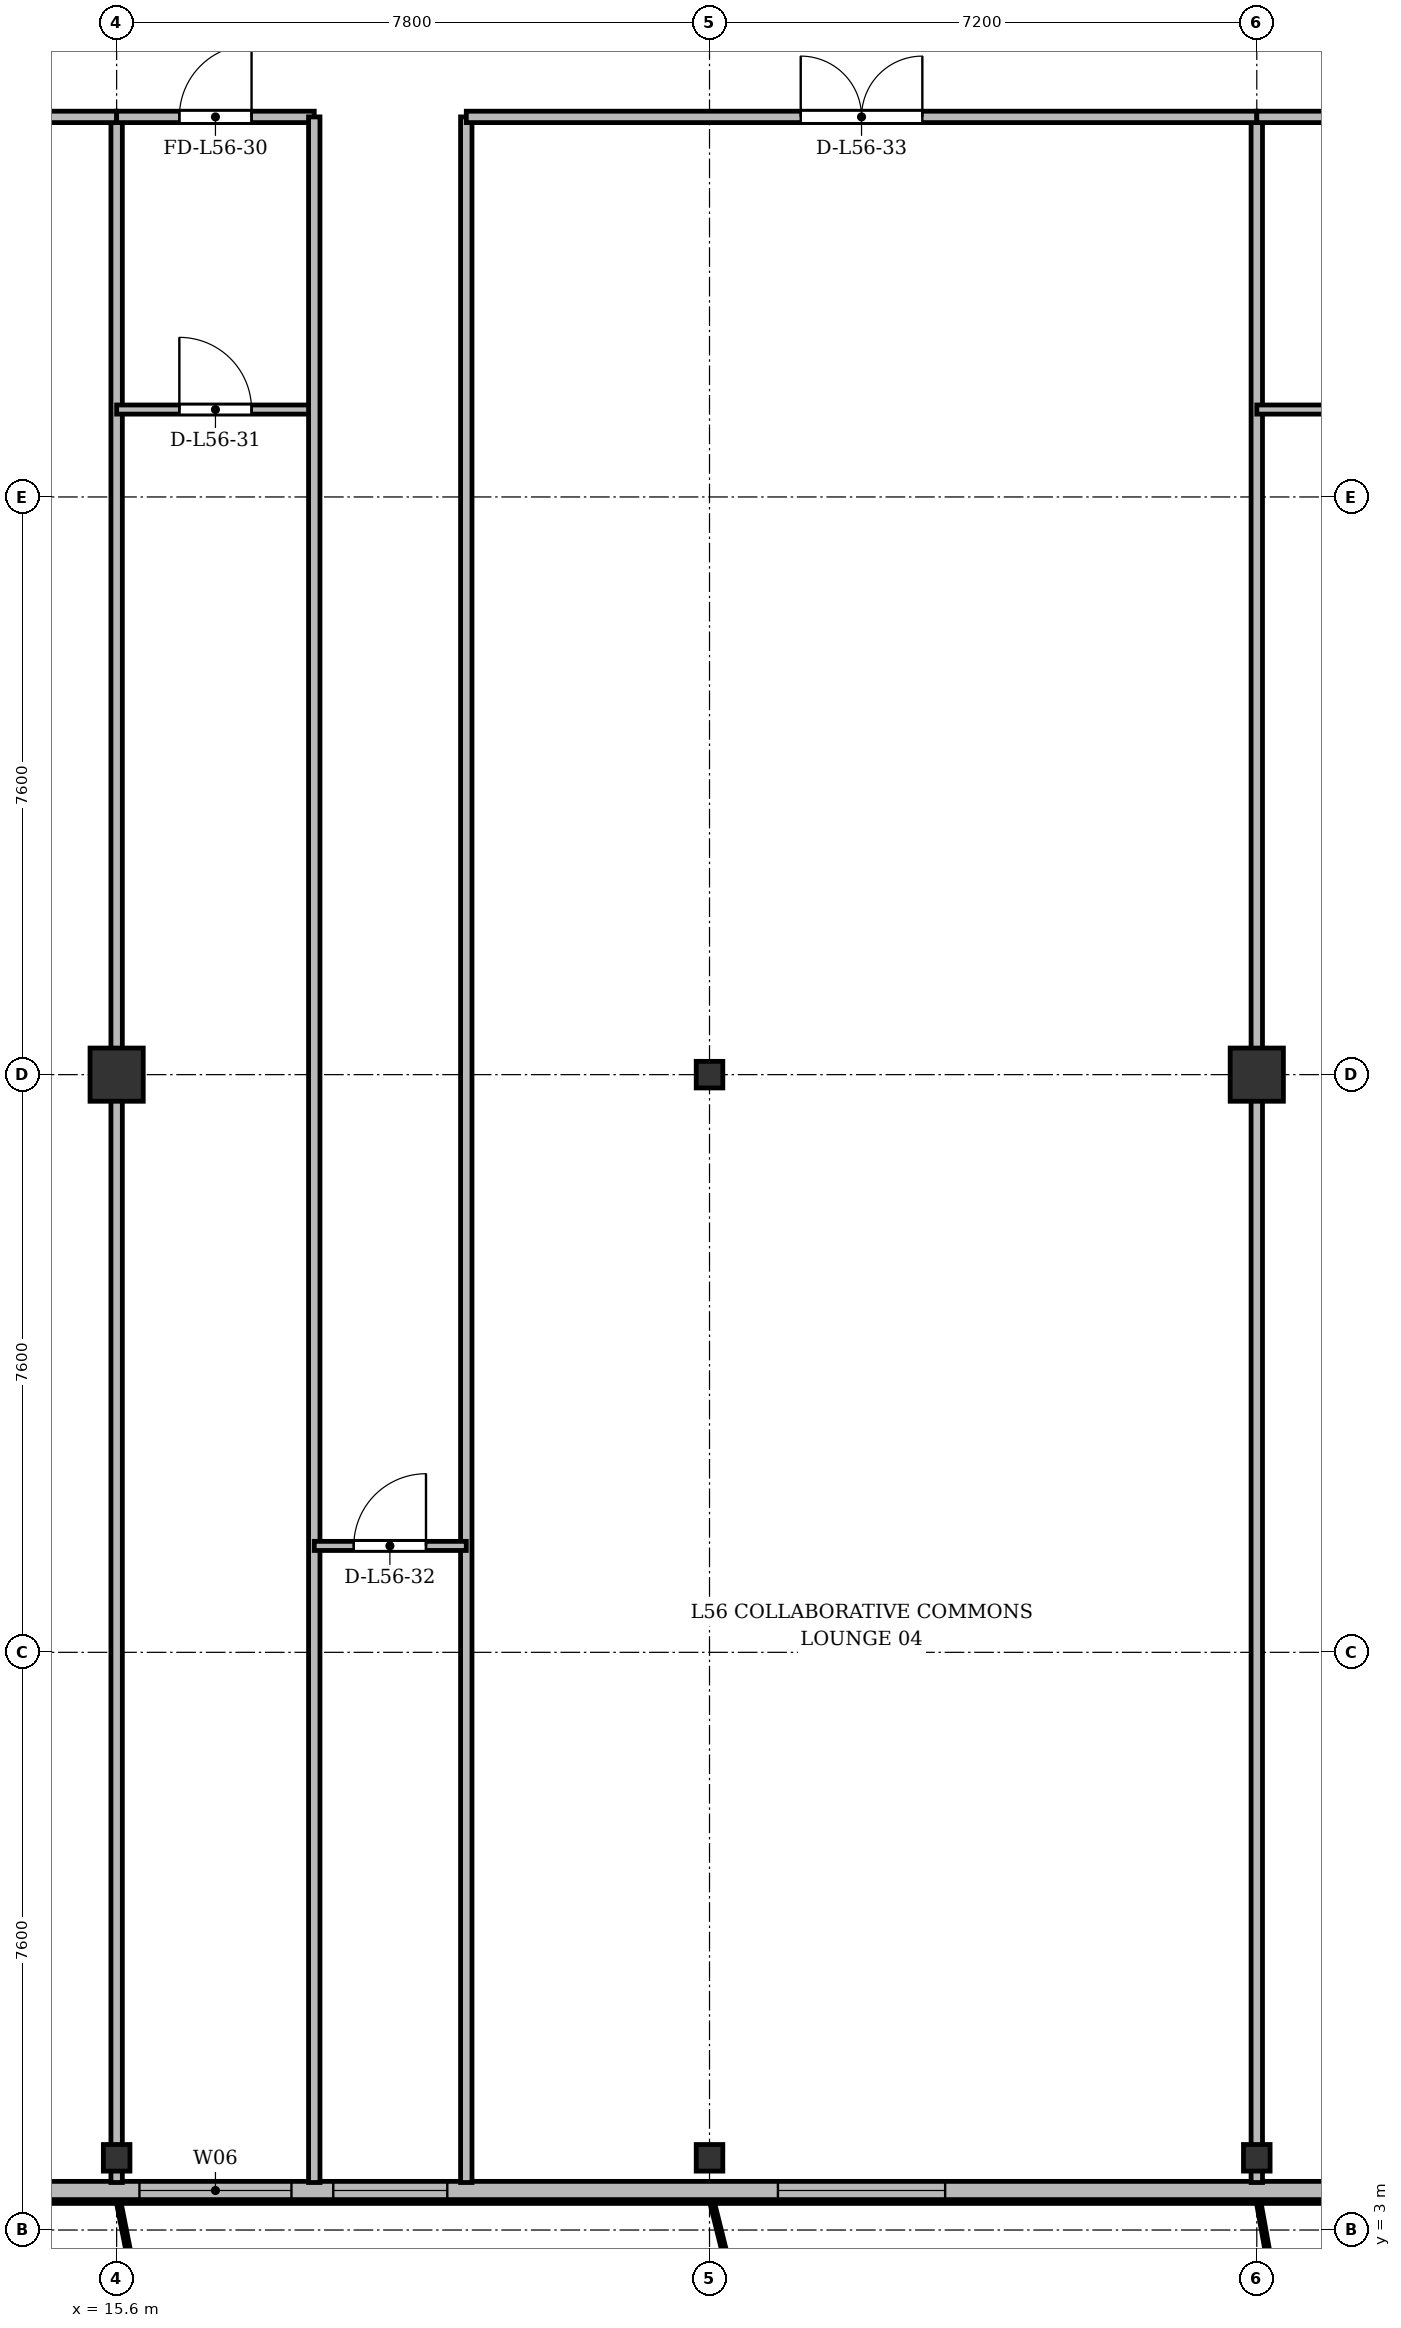
"""IFC4 building model, lengths in metres.
Left out: names, types, materials, properties, quantities, classifications, styles, units other than length and angle.
Written with IfcOpenShell. Run it as: python <this file> out.ifc"""

import sys

from ifc_helpers import new_model, si_unit, direction, frame, frame_2d, origin, origin_2d, place, context, subcontext, project, spatial, rectangle, i_section, extrude, source, transform, mapped, element, fill, save


model = new_model("IFC4")
c1 = context("Model", 3, precision=1e-05, world=origin(), true_north=direction((0.0, 1.0)))
c2 = subcontext(c1, "Body", "Model", "MODEL_VIEW")
j1 = project(units=[si_unit("LENGTHUNIT", "METRE"), si_unit("PLANEANGLEUNIT", "RADIAN")], contexts=[c1])
p1 = place(None, origin())
s1 = spatial("IfcSite", under=j1, at=p1, CompositionType="ELEMENT")
p2 = place(p1, origin())
s2 = spatial("IfcBuilding", under=s1, at=p2, CompositionType="ELEMENT")
p3 = place(p2, frame((0.0, 0.0, 215.7)))
s3 = spatial("IfcBuildingStorey", under=s2, at=p3, CompositionType="ELEMENT", Elevation=215.7)
m1 = source(origin(), c2, "Body", "SweptSolid", [
    extrude(i_section(OverallWidth=0.35, OverallDepth=0.35, WebThickness=0.018, FlangeThickness=0.028, at=origin_2d()), origin(), (0.0, 0.0, 1.0), 3.6),
])
p4 = place(p3, frame((15.6, 3.95, 0.0), z_axis=(0.0, 0.0, 1.0), x_axis=(1.0, 0.0, 0.0)))
e1 = element("IfcColumn", 1, at=p4, inside=s3, PredefinedType="COLUMN", context=c2, shape_type="MappedRepresentation", body=[
    mapped(m1, transform((0.0, 0.0, 0.0), x_axis=(1.0, 0.0, 0.0), y_axis=(0.0, 1.0, 0.0), z_axis=(0.0, 0.0, 1.0), scale=1.0)),
])
m2 = source(origin(), c2, "Body", "SweptSolid", [
    extrude(rectangle(XDim=0.7, YDim=0.7, at=origin_2d()), origin(), (0.0, 0.0, 1.0), 3.6),
])
p5 = place(p3, frame((15.6, 18.2, 0.0), z_axis=(0.0, 0.0, 1.0), x_axis=(1.0, 0.0, 0.0)))
e2 = element("IfcColumn", 2, at=p5, inside=s3, PredefinedType="COLUMN", context=c2, shape_type="MappedRepresentation", body=[
    mapped(m2, transform((0.0, 0.0, 0.0), x_axis=(1.0, 0.0, 0.0), y_axis=(0.0, 1.0, 0.0), z_axis=(0.0, 0.0, 1.0), scale=1.0)),
])
for number, where, z_axis, x_axis in (
    (3, (23.4, 3.95, 0.0), (0.0, 0.0, 1.0), (1.0, 0.0, 0.0)),
    (4, (23.4, 18.2, 0.0), (0.0, 0.0, 1.0), (1.0, 0.0, 0.0)),
    (5, (30.6, 3.95, 0.0), (0.0, 0.0, 1.0), (1.0, 0.0, 0.0)),
):
    element("IfcColumn", number, at=place(p3, frame(where, z_axis=z_axis, x_axis=x_axis)), inside=s3, PredefinedType="COLUMN", context=c2, shape_type="MappedRepresentation", body=[
        mapped(m1, transform((0.0, 0.0, 0.0), x_axis=(1.0, 0.0, 0.0), y_axis=(0.0, 1.0, 0.0), z_axis=(0.0, 0.0, 1.0), scale=1.0)),
    ])
p6 = place(p3, frame((30.6, 18.2, 0.0), z_axis=(0.0, 0.0, 1.0), x_axis=(1.0, 0.0, 0.0)))
e6 = element("IfcColumn", 6, at=p6, inside=s3, PredefinedType="COLUMN", context=c2, shape_type="MappedRepresentation", body=[
    mapped(m2, transform((0.0, 0.0, 0.0), x_axis=(1.0, 0.0, 0.0), y_axis=(0.0, 1.0, 0.0), z_axis=(0.0, 0.0, 1.0), scale=1.0)),
])
p7 = place(p3, frame((63.4, 3.52, 0.0), z_axis=(0.0, 0.0, 1.0), x_axis=(-1.0, 0.0, 0.0)))
e7 = element("IfcWall", 7, at=p7, inside=s3, PredefinedType="SOLIDWALL", context=c2, shape_type="SweptSolid", body=[
    extrude(rectangle(XDim=52.4, YDim=0.24, at=frame_2d((26.2, 0.0))), origin(), (0.0, 0.0, 1.0), 3.36),
])
p8 = place(p7, frame((1.245, 0.0, 0.9)))
e8 = element("IfcOpeningElement", 8, at=p8, cuts=e7, PredefinedType="OPENING", context=c2, shape_type="SweptSolid", body=[
    extrude(rectangle(XDim=2.2, YDim=1.8, at=frame_2d((1.1, 0.9))), frame((0.0, 0.13, 0.0), z_axis=(0.0, -1.0, 0.0), x_axis=(1.0, 0.0, 0.0)), (0.0, 0.0, 1.0), 0.26),
])
p9 = place(p7, frame((5.15, 0.0, 0.9)))
e9 = element("IfcOpeningElement", 9, at=p9, cuts=e7, PredefinedType="OPENING", context=c2, shape_type="SweptSolid", body=[
    extrude(rectangle(XDim=1.5, YDim=1.75, at=frame_2d((0.75, 0.875))), frame((0.0, 0.13, 0.0), z_axis=(0.0, -1.0, 0.0), x_axis=(1.0, 0.0, 0.0)), (0.0, 0.0, 1.0), 0.26),
])
p10 = place(p7, frame((7.45, 0.0, 0.9)))
e10 = element("IfcOpeningElement", 10, at=p10, cuts=e7, PredefinedType="OPENING", context=c2, shape_type="SweptSolid", body=[
    extrude(rectangle(XDim=1.5, YDim=1.75, at=frame_2d((0.75, 0.875))), frame((0.0, 0.13, 0.0), z_axis=(0.0, -1.0, 0.0), x_axis=(1.0, 0.0, 0.0)), (0.0, 0.0, 1.0), 0.26),
])
p11 = place(p7, frame((13.575, 0.0, 0.9)))
e11 = element("IfcOpeningElement", 11, at=p11, cuts=e7, PredefinedType="OPENING", context=c2, shape_type="SweptSolid", body=[
    extrude(rectangle(XDim=1.65, YDim=1.85, at=frame_2d((0.825, 0.925))), frame((0.0, 0.13, 0.0), z_axis=(0.0, -1.0, 0.0), x_axis=(1.0, 0.0, 0.0)), (0.0, 0.0, 1.0), 0.26),
])
p12 = place(p7, frame((25.3, 0.0, 0.9)))
e12 = element("IfcOpeningElement", 12, at=p12, cuts=e7, PredefinedType="OPENING", context=c2, shape_type="SweptSolid", body=[
    extrude(rectangle(XDim=1.8, YDim=1.8, at=frame_2d((0.9, 0.9))), frame((0.0, 0.13, 0.0), z_axis=(0.0, -1.0, 0.0), x_axis=(1.0, 0.0, 0.0)), (0.0, 0.0, 1.0), 0.26),
])
p13 = place(p7, frame((36.9, 0.0, 0.9)))
e13 = element("IfcOpeningElement", 13, at=p13, cuts=e7, PredefinedType="OPENING", context=c2, shape_type="SweptSolid", body=[
    extrude(rectangle(XDim=2.2, YDim=1.8, at=frame_2d((1.1, 0.9))), frame((0.0, 0.13, 0.0), z_axis=(0.0, -1.0, 0.0), x_axis=(1.0, 0.0, 0.0)), (0.0, 0.0, 1.0), 0.26),
])
p14 = place(p7, frame((43.45, 0.0, 0.9)))
e14 = element("IfcOpeningElement", 14, at=p14, cuts=e7, PredefinedType="OPENING", context=c2, shape_type="SweptSolid", body=[
    extrude(rectangle(XDim=1.5, YDim=1.75, at=frame_2d((0.75, 0.875))), frame((0.0, 0.13, 0.0), z_axis=(0.0, -1.0, 0.0), x_axis=(1.0, 0.0, 0.0)), (0.0, 0.0, 1.0), 0.26),
])
p15 = place(p7, frame((45.5, 0.0, 0.9)))
e15 = element("IfcOpeningElement", 15, at=p15, cuts=e7, PredefinedType="OPENING", context=c2, shape_type="SweptSolid", body=[
    extrude(rectangle(XDim=2.0, YDim=1.95, at=frame_2d((1.0, 0.975))), frame((0.0, 0.13, 0.0), z_axis=(0.0, -1.0, 0.0), x_axis=(1.0, 0.0, 0.0)), (0.0, 0.0, 1.0), 0.26),
])
p16 = place(p7, frame((49.23, 0.0, 0.9)))
e16 = element("IfcOpeningElement", 16, at=p16, cuts=e7, PredefinedType="OPENING", context=c2, shape_type="SweptSolid", body=[
    extrude(rectangle(XDim=1.65, YDim=1.85, at=frame_2d((0.825, 0.925))), frame((0.0, 0.13, 0.0), z_axis=(0.0, -1.0, 0.0), x_axis=(1.0, 0.0, 0.0)), (0.0, 0.0, 1.0), 0.26),
])
for number, where, z_axis, x_axis in (
    (17, (15.6, 3.625, 0.0), (0.0, 0.0, 1.0), (0.0, 1.0, 0.0)),
    (18, (30.6, 3.625, 0.0), (0.0, 0.0, 1.0), (0.0, 1.0, 0.0)),
):
    element("IfcWall", number, at=place(p3, frame(where, z_axis=z_axis, x_axis=x_axis)), inside=s3, PredefinedType="PARTITIONING", context=c2, shape_type="SweptSolid", body=[
        extrude(rectangle(XDim=27.175, YDim=0.15, at=frame_2d((13.587, 0.0))), origin(), (0.0, 0.0, 1.0), 2.86),
    ])
p17 = place(p3, frame((8.225, 30.8, 0.0), z_axis=(0.0, 0.0, 1.0), x_axis=(1.0, 0.0, 0.0)))
e19 = element("IfcWall", 19, at=p17, inside=s3, PredefinedType="PARTITIONING", context=c2, shape_type="SweptSolid", body=[
    extrude(rectangle(XDim=7.375, YDim=0.15, at=frame_2d((3.688, 0.0))), origin(), (0.0, 0.0, 1.0), 2.86),
])
p18 = place(p17, frame((2.795, 0.0, 0.0)))
e20 = element("IfcOpeningElement", 20, at=p18, cuts=e19, PredefinedType="OPENING", context=c2, shape_type="SweptSolid", body=[
    extrude(rectangle(XDim=1.6, YDim=2.2, at=frame_2d((0.8, 1.1))), frame((0.0, 0.085, 0.0), z_axis=(0.0, -1.0, 0.0), x_axis=(1.0, 0.0, 0.0)), (0.0, 0.0, 1.0), 0.17),
])
p19 = place(p3, frame((15.6, 30.8, 0.0), z_axis=(0.0, 0.0, 1.0), x_axis=(1.0, 0.0, 0.0)))
e21 = element("IfcWall", 21, at=p19, inside=s3, PredefinedType="PARTITIONING", context=c2, shape_type="SweptSolid", body=[
    extrude(rectangle(XDim=2.6, YDim=0.15, at=frame_2d((1.3, 0.0))), origin(), (0.0, 0.0, 1.0), 2.86),
])
p20 = place(p19, frame((0.825, 0.0, 0.0)))
e22 = element("IfcOpeningElement", 22, at=p20, cuts=e21, PredefinedType="OPENING", context=c2, shape_type="SweptSolid", body=[
    extrude(rectangle(XDim=0.95, YDim=2.15, at=frame_2d((0.475, 1.075))), frame((0.0, 0.085, 0.0), z_axis=(0.0, -1.0, 0.0), x_axis=(1.0, 0.0, 0.0)), (0.0, 0.0, 1.0), 0.17),
])
p21 = place(p3, frame((15.6, 26.95, 0.0), z_axis=(0.0, 0.0, 1.0), x_axis=(1.0, 0.0, 0.0)))
e23 = element("IfcWall", 23, at=p21, inside=s3, PredefinedType="PARTITIONING", context=c2, shape_type="SweptSolid", body=[
    extrude(rectangle(XDim=2.6, YDim=0.12, at=frame_2d((1.3, 0.0))), origin(), (0.0, 0.0, 1.0), 2.86),
])
p22 = place(p21, frame((0.825, 0.0, 0.0)))
e24 = element("IfcOpeningElement", 24, at=p22, cuts=e23, PredefinedType="OPENING", context=c2, shape_type="SweptSolid", body=[
    extrude(rectangle(XDim=0.95, YDim=2.15, at=frame_2d((0.475, 1.075))), frame((0.0, 0.07, 0.0), z_axis=(0.0, -1.0, 0.0), x_axis=(1.0, 0.0, 0.0)), (0.0, 0.0, 1.0), 0.14),
])
for number, where, z_axis, x_axis in (
    (25, (18.2, 3.625, 0.0), (0.0, 0.0, 1.0), (0.0, 1.0, 0.0)),
    (26, (20.2, 3.625, 0.0), (0.0, 0.0, 1.0), (0.0, 1.0, 0.0)),
):
    element("IfcWall", number, at=place(p3, frame(where, z_axis=z_axis, x_axis=x_axis)), inside=s3, PredefinedType="PARTITIONING", context=c2, shape_type="SweptSolid", body=[
        extrude(rectangle(XDim=27.175, YDim=0.15, at=frame_2d((13.587, 0.0))), origin(), (0.0, 0.0, 1.0), 2.91),
    ])
p23 = place(p3, frame((18.2, 12.0, 0.0), z_axis=(0.0, 0.0, 1.0), x_axis=(1.0, 0.0, 0.0)))
e27 = element("IfcWall", 27, at=p23, inside=s3, PredefinedType="PARTITIONING", context=c2, shape_type="SweptSolid", body=[
    extrude(rectangle(XDim=2.0, YDim=0.12, at=frame_2d((1.0, 0.0))), origin(), (0.0, 0.0, 1.0), 3.36),
])
p24 = place(p23, frame((0.52, 0.0, 0.0)))
e28 = element("IfcOpeningElement", 28, at=p24, cuts=e27, PredefinedType="OPENING", context=c2, shape_type="SweptSolid", body=[
    extrude(rectangle(XDim=0.95, YDim=2.15, at=frame_2d((0.475, 1.075))), frame((0.0, 0.07, 0.0), z_axis=(0.0, -1.0, 0.0), x_axis=(1.0, 0.0, 0.0)), (0.0, 0.0, 1.0), 0.14),
])
p25 = place(p3, frame((20.2, 30.8, 0.0), z_axis=(0.0, 0.0, 1.0), x_axis=(1.0, 0.0, 0.0)))
e29 = element("IfcWall", 29, at=p25, inside=s3, PredefinedType="PARTITIONING", context=c2, shape_type="SweptSolid", body=[
    extrude(rectangle(XDim=10.4, YDim=0.15, at=frame_2d((5.2, 0.0))), origin(), (0.0, 0.0, 1.0), 2.86),
])
p26 = place(p25, frame((4.4, 0.0, 0.0)))
e30 = element("IfcOpeningElement", 30, at=p26, cuts=e29, PredefinedType="OPENING", context=c2, shape_type="SweptSolid", body=[
    extrude(rectangle(XDim=1.6, YDim=2.2, at=frame_2d((0.8, 1.1))), frame((0.0, 0.085, 0.0), z_axis=(0.0, -1.0, 0.0), x_axis=(1.0, 0.0, 0.0)), (0.0, 0.0, 1.0), 0.17),
])
p27 = place(p3, frame((30.6, 30.8, 0.0), z_axis=(0.0, 0.0, 1.0), x_axis=(1.0, 0.0, 0.0)))
e31 = element("IfcWall", 31, at=p27, inside=s3, PredefinedType="PARTITIONING", context=c2, shape_type="SweptSolid", body=[
    extrude(rectangle(XDim=13.2, YDim=0.15, at=frame_2d((6.6, 0.0))), origin(), (0.0, 0.0, 1.0), 2.86),
])
p28 = place(p27, frame((6.034, 0.0, 0.0)))
e32 = element("IfcOpeningElement", 32, at=p28, cuts=e31, PredefinedType="OPENING", context=c2, shape_type="SweptSolid", body=[
    extrude(rectangle(XDim=0.95, YDim=2.15, at=frame_2d((0.475, 1.075))), frame((0.0, 0.085, 0.0), z_axis=(0.0, -1.0, 0.0), x_axis=(1.0, 0.0, 0.0)), (0.0, 0.0, 1.0), 0.17),
])
p29 = place(p3, frame((30.6, 26.95, 0.0), z_axis=(0.0, 0.0, 1.0), x_axis=(1.0, 0.0, 0.0)))
e33 = element("IfcWall", 33, at=p29, inside=s3, PredefinedType="PARTITIONING", context=c2, shape_type="SweptSolid", body=[
    extrude(rectangle(XDim=13.2, YDim=0.12, at=frame_2d((6.6, 0.0))), origin(), (0.0, 0.0, 1.0), 2.86),
])
p30 = place(p29, frame((6.034, 0.0, 0.0)))
e34 = element("IfcOpeningElement", 34, at=p30, cuts=e33, PredefinedType="OPENING", context=c2, shape_type="SweptSolid", body=[
    extrude(rectangle(XDim=0.95, YDim=2.15, at=frame_2d((0.475, 1.075))), frame((0.0, 0.07, 0.0), z_axis=(0.0, -1.0, 0.0), x_axis=(1.0, 0.0, 0.0)), (0.0, 0.0, 1.0), 0.14),
])
m3 = source(origin(), c2, "Body", "SweptSolid", [
    extrude(rectangle(XDim=2.2, YDim=1.8, at=frame_2d((1.1, 0.9))), frame((0.0, 0.03, 0.0), z_axis=(0.0, -1.0, 0.0), x_axis=(1.0, 0.0, 0.0)), (0.0, 0.0, 1.0), 0.06),
])
p31 = place(p13, origin())
e35 = element("IfcWindow", 35, at=p31, inside=s3, PartitioningType="SINGLE_PANEL", PredefinedType="WINDOW", context=c2, shape_type="MappedRepresentation", body=[
    mapped(m3, transform((0.0, 0.0, 0.0), x_axis=(1.0, 0.0, 0.0), y_axis=(0.0, 1.0, 0.0), z_axis=(0.0, 0.0, 1.0), scale=1.0)),
])
fill(e13, e35)
m4 = source(origin(), c2, "Body", "SweptSolid", [
    extrude(rectangle(XDim=1.5, YDim=1.75, at=frame_2d((0.75, 0.875))), frame((0.0, 0.03, 0.0), z_axis=(0.0, -1.0, 0.0), x_axis=(1.0, 0.0, 0.0)), (0.0, 0.0, 1.0), 0.06),
])
p32 = place(p14, origin())
e36 = element("IfcWindow", 36, at=p32, inside=s3, PartitioningType="SINGLE_PANEL", PredefinedType="WINDOW", context=c2, shape_type="MappedRepresentation", body=[
    mapped(m4, transform((0.0, 0.0, 0.0), x_axis=(1.0, 0.0, 0.0), y_axis=(0.0, 1.0, 0.0), z_axis=(0.0, 0.0, 1.0), scale=1.0)),
])
fill(e14, e36)
m5 = source(origin(), c2, "Body", "SweptSolid", [
    extrude(rectangle(XDim=2.0, YDim=1.95, at=frame_2d((1.0, 0.975))), frame((0.0, 0.03, 0.0), z_axis=(0.0, -1.0, 0.0), x_axis=(1.0, 0.0, 0.0)), (0.0, 0.0, 1.0), 0.06),
])
p33 = place(p15, origin())
e37 = element("IfcWindow", 37, at=p33, inside=s3, PartitioningType="SINGLE_PANEL", PredefinedType="WINDOW", context=c2, shape_type="MappedRepresentation", body=[
    mapped(m5, transform((0.0, 0.0, 0.0), x_axis=(1.0, 0.0, 0.0), y_axis=(0.0, 1.0, 0.0), z_axis=(0.0, 0.0, 1.0), scale=1.0)),
])
fill(e15, e37)
m6 = source(origin(), c2, "Body", "SweptSolid", [
    extrude(rectangle(XDim=0.95, YDim=2.15, at=frame_2d((0.475, 1.075))), frame((0.0, 0.025, 0.0), z_axis=(0.0, -1.0, 0.0), x_axis=(1.0, 0.0, 0.0)), (0.0, 0.0, 1.0), 0.05),
])
p34 = place(p20, origin())
e38 = element("IfcDoor", 38, at=p34, inside=s3, OperationType="SINGLE_SWING_RIGHT", PredefinedType="DOOR", context=c2, shape_type="MappedRepresentation", body=[
    mapped(m6, transform((0.0, 0.0, 0.0), x_axis=(1.0, 0.0, 0.0), y_axis=(0.0, 1.0, 0.0), z_axis=(0.0, 0.0, 1.0), scale=1.0)),
])
fill(e22, e38)
p35 = place(p22, origin())
e39 = element("IfcDoor", 39, at=p35, inside=s3, OperationType="SINGLE_SWING_LEFT", PredefinedType="DOOR", context=c2, shape_type="MappedRepresentation", body=[
    mapped(m6, transform((0.0, 0.0, 0.0), x_axis=(1.0, 0.0, 0.0), y_axis=(0.0, 1.0, 0.0), z_axis=(0.0, 0.0, 1.0), scale=1.0)),
])
fill(e24, e39)
p36 = place(p24, origin())
e40 = element("IfcDoor", 40, at=p36, inside=s3, OperationType="SINGLE_SWING_RIGHT", PredefinedType="DOOR", context=c2, shape_type="MappedRepresentation", body=[
    mapped(m6, transform((0.0, 0.0, 0.0), x_axis=(1.0, 0.0, 0.0), y_axis=(0.0, 1.0, 0.0), z_axis=(0.0, 0.0, 1.0), scale=1.0)),
])
fill(e28, e40)
m7 = source(origin(), c2, "Body", "SweptSolid", [
    extrude(rectangle(XDim=1.6, YDim=2.2, at=frame_2d((0.8, 1.1))), frame((0.0, 0.025, 0.0), z_axis=(0.0, -1.0, 0.0), x_axis=(1.0, 0.0, 0.0)), (0.0, 0.0, 1.0), 0.05),
])
p37 = place(p26, origin())
e41 = element("IfcDoor", 41, at=p37, inside=s3, OperationType="DOUBLE_DOOR_SINGLE_SWING", PredefinedType="DOOR", context=c2, shape_type="MappedRepresentation", body=[
    mapped(m7, transform((0.0, 0.0, 0.0), x_axis=(1.0, 0.0, 0.0), y_axis=(0.0, 1.0, 0.0), z_axis=(0.0, 0.0, 1.0), scale=1.0)),
])
fill(e30, e41)
save(model, sys.argv[1])
